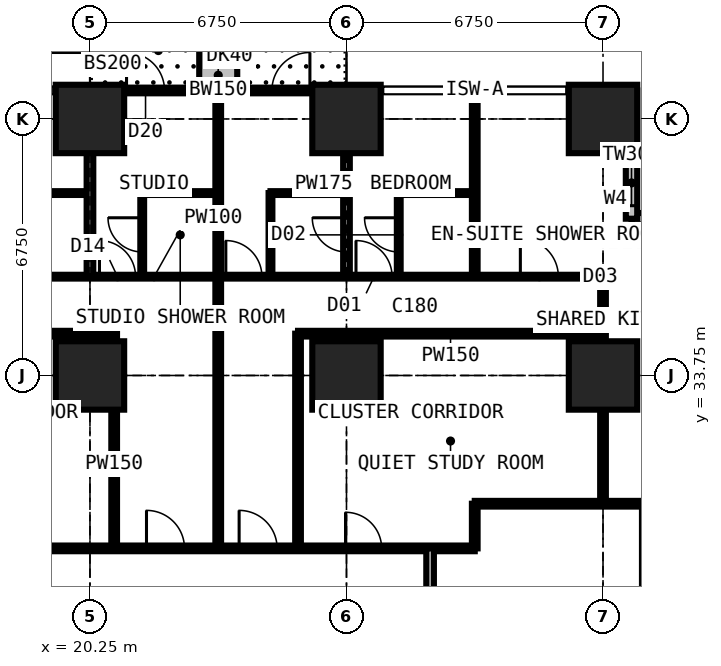
"""IFC4 building model, lengths in metres.
Left out: names, types, materials, properties, quantities, classifications, styles, units other than length and angle.
Written with IfcOpenShell. Run it as: python <this file> out.ifc"""

import sys

from ifc_helpers import new_model, si_unit, direction, frame, frame_2d, origin, origin_2d, place, context, subcontext, project, spatial, rectangle, extrude, element, fill, save


model = new_model("IFC4")
c1 = context("Model", 3, precision=1e-05, world=origin(), true_north=direction((0.0, 1.0)))
c2 = subcontext(c1, "Body", "Model", "MODEL_VIEW")
j1 = project(units=[si_unit("LENGTHUNIT", "METRE"), si_unit("PLANEANGLEUNIT", "RADIAN")], contexts=[c1])
p1 = place(None, origin())
s1 = spatial("IfcSite", under=j1, at=p1, CompositionType="ELEMENT")
p2 = place(p1, origin())
s2 = spatial("IfcBuilding", under=s1, at=p2, CompositionType="ELEMENT")
p3 = place(p2, frame((0.0, 0.0, 50.4)))
s3 = spatial("IfcBuildingStorey", under=s2, at=p3, CompositionType="ELEMENT", Elevation=50.4)
for number, where, z_axis, x_axis in (
    (1, (20.25, 33.75, 0.0), (0.0, 0.0, 1.0), (1.0, 0.0, 0.0)),
    (2, (20.25, 40.5, 0.0), (0.0, 0.0, 1.0), (1.0, 0.0, 0.0)),
    (3, (27.0, 33.75, 0.0), (0.0, 0.0, 1.0), (1.0, 0.0, 0.0)),
    (4, (27.0, 40.5, 0.0), (0.0, 0.0, 1.0), (1.0, 0.0, 0.0)),
    (5, (33.75, 33.75, 0.0), (0.0, 0.0, 1.0), (1.0, 0.0, 0.0)),
    (6, (33.75, 40.5, 0.0), (0.0, 0.0, 1.0), (1.0, 0.0, 0.0)),
):
    element("IfcColumn", number, at=place(p3, frame(where, z_axis=z_axis, x_axis=x_axis)), inside=s3, PredefinedType="COLUMN", context=c2, shape_type="SweptSolid", body=[
        extrude(rectangle(XDim=1.8, YDim=1.8, at=origin_2d()), origin(), (0.0, 0.0, 1.0), 3.6),
    ])
p4 = place(p3, frame((37.875, 37.875, 0.0), z_axis=(0.0, 0.0, 1.0), x_axis=(-1.0, 0.0, 0.0)))
e7 = element("IfcWall", 7, at=p4, inside=s3, PredefinedType="SOLIDWALL", context=c2, shape_type="SweptSolid", body=[
    extrude(rectangle(XDim=3.375, YDim=0.3, at=frame_2d((1.688, 0.0))), origin(), (0.0, 0.0, 1.0), 3.375),
])
p5 = place(p4, frame((0.788, 0.0, 0.6)))
e8 = element("IfcOpeningElement", 8, at=p5, cuts=e7, PredefinedType="OPENING", context=c2, shape_type="SweptSolid", body=[
    extrude(rectangle(XDim=1.8, YDim=2.1, at=frame_2d((0.9, 1.05))), frame((0.0, 0.16, 0.0), z_axis=(0.0, -1.0, 0.0), x_axis=(1.0, 0.0, 0.0)), (0.0, 0.0, 1.0), 0.32),
])
p6 = place(p3, frame((34.5, 37.875, 0.0), z_axis=(0.0, 0.0, 1.0), x_axis=(0.0, 1.0, 0.0)))
e9 = element("IfcWall", 9, at=p6, inside=s3, PredefinedType="SOLIDWALL", context=c2, shape_type="SweptSolid", body=[
    extrude(rectangle(XDim=3.375, YDim=0.3, at=frame_2d((1.688, 0.0))), origin(), (0.0, 0.0, 1.0), 3.375),
])
p7 = place(p6, frame((0.343, 0.0, 0.9)))
e10 = element("IfcOpeningElement", 10, at=p7, cuts=e9, PredefinedType="OPENING", context=c2, shape_type="SweptSolid", body=[
    extrude(rectangle(XDim=1.2, YDim=1.8, at=frame_2d((0.6, 0.9))), frame((0.0, 0.16, 0.0), z_axis=(0.0, -1.0, 0.0), x_axis=(1.0, 0.0, 0.0)), (0.0, 0.0, 1.0), 0.32),
])
p8 = place(p3, frame((20.25, 41.25, 0.0), z_axis=(0.0, 0.0, 1.0), x_axis=(1.0, 0.0, 0.0)))
e11 = element("IfcWall", 11, at=p8, inside=s3, PredefinedType="SOLIDWALL", context=c2, shape_type="SweptSolid", body=[
    extrude(rectangle(XDim=6.75, YDim=0.15, at=frame_2d((3.375, 0.0))), origin(), (0.0, 0.0, 1.0), 3.375),
])
p9 = place(p8, frame((0.962, 0.0, 0.0)))
e12 = element("IfcOpeningElement", 12, at=p9, cuts=e11, PredefinedType="OPENING", context=c2, shape_type="SweptSolid", body=[
    extrude(rectangle(XDim=1.0, YDim=2.2, at=frame_2d((0.5, 1.1))), frame((0.0, 0.085, 0.0), z_axis=(0.0, -1.0, 0.0), x_axis=(1.0, 0.0, 0.0)), (0.0, 0.0, 1.0), 0.17),
])
p10 = place(p8, frame((2.025, 0.0, 0.9)))
e13 = element("IfcOpeningElement", 13, at=p10, cuts=e11, PredefinedType="OPENING", context=c2, shape_type="SweptSolid", body=[
    extrude(rectangle(XDim=1.2, YDim=1.8, at=frame_2d((0.6, 0.9))), frame((0.0, 0.085, 0.0), z_axis=(0.0, -1.0, 0.0), x_axis=(1.0, 0.0, 0.0)), (0.0, 0.0, 1.0), 0.17),
])
p11 = place(p8, frame((4.788, 0.0, 0.0)))
e14 = element("IfcOpeningElement", 14, at=p11, cuts=e11, PredefinedType="OPENING", context=c2, shape_type="SweptSolid", body=[
    extrude(rectangle(XDim=1.0, YDim=2.2, at=frame_2d((0.5, 1.1))), frame((0.0, 0.085, 0.0), z_axis=(0.0, -1.0, 0.0), x_axis=(1.0, 0.0, 0.0)), (0.0, 0.0, 1.0), 0.17),
])
p12 = place(p8, frame((3.525, 0.0, 0.9)))
e15 = element("IfcOpeningElement", 15, at=p12, cuts=e11, PredefinedType="OPENING", context=c2, shape_type="SweptSolid", body=[
    extrude(rectangle(XDim=1.2, YDim=1.8, at=frame_2d((0.6, 0.9))), frame((0.0, 0.085, 0.0), z_axis=(0.0, -1.0, 0.0), x_axis=(1.0, 0.0, 0.0)), (0.0, 0.0, 1.0), 0.17),
])
p13 = place(p3, frame((23.625, 41.35, 0.0), z_axis=(0.0, 0.0, 1.0), x_axis=(0.0, 1.0, 0.0)))
e16 = element("IfcWall", 16, at=p13, inside=s3, PredefinedType="USERDEFINED", context=c2, shape_type="SweptSolid", body=[
    extrude(rectangle(XDim=2.2, YDim=1.0, at=frame_2d((1.1, 0.0))), origin(), (0.0, 0.0, 1.0), 0.9),
])
p14 = place(p3, frame((10.125, 34.85, 0.0), z_axis=(0.0, 0.0, 1.0), x_axis=(1.0, 0.0, 0.0)))
e17 = element("IfcWall", 17, at=p14, inside=s3, PredefinedType="PARTITIONING", context=c2, shape_type="SweptSolid", body=[
    extrude(rectangle(XDim=10.762, YDim=0.15, at=frame_2d((5.381, 0.0))), origin(), (0.0, 0.0, 1.0), 3.375),
])
p15 = place(p14, frame((4.9, 0.0, 0.0)))
e18 = element("IfcOpeningElement", 18, at=p15, cuts=e17, PredefinedType="OPENING", context=c2, shape_type="SweptSolid", body=[
    extrude(rectangle(XDim=0.95, YDim=2.2, at=frame_2d((0.475, 1.1))), frame((0.0, 0.085, 0.0), z_axis=(0.0, -1.0, 0.0), x_axis=(1.0, 0.0, 0.0)), (0.0, 0.0, 1.0), 0.17),
])
p16 = place(p3, frame((10.125, 36.35, 0.0), z_axis=(0.0, 0.0, 1.0), x_axis=(1.0, 0.0, 0.0)))
e19 = element("IfcWall", 19, at=p16, inside=s3, PredefinedType="PARTITIONING", context=c2, shape_type="SweptSolid", body=[
    extrude(rectangle(XDim=23.625, YDim=0.1, at=frame_2d((11.812, 0.0))), origin(), (0.0, 0.0, 1.0), 3.375),
])
p17 = place(p16, frame((21.45, 0.0, 0.0)))
e20 = element("IfcOpeningElement", 20, at=p17, cuts=e19, PredefinedType="OPENING", context=c2, shape_type="SweptSolid", body=[
    extrude(rectangle(XDim=1.0, YDim=2.2, at=frame_2d((0.5, 1.1))), frame((0.0, 0.06, 0.0), z_axis=(0.0, -1.0, 0.0), x_axis=(1.0, 0.0, 0.0)), (0.0, 0.0, 1.0), 0.12),
])
p18 = place(p16, frame((17.125, 0.0, 0.0)))
e21 = element("IfcOpeningElement", 21, at=p18, cuts=e19, PredefinedType="OPENING", context=c2, shape_type="SweptSolid", body=[
    extrude(rectangle(XDim=0.95, YDim=2.2, at=frame_2d((0.475, 1.1))), frame((0.0, 0.06, 0.0), z_axis=(0.0, -1.0, 0.0), x_axis=(1.0, 0.0, 0.0)), (0.0, 0.0, 1.0), 0.12),
])
p19 = place(p16, frame((13.7, 0.0, 0.0)))
e22 = element("IfcOpeningElement", 22, at=p19, cuts=e19, PredefinedType="OPENING", context=c2, shape_type="SweptSolid", body=[
    extrude(rectangle(XDim=0.95, YDim=2.2, at=frame_2d((0.475, 1.1))), frame((0.0, 0.06, 0.0), z_axis=(0.0, -1.0, 0.0), x_axis=(1.0, 0.0, 0.0)), (0.0, 0.0, 1.0), 0.12),
])
p20 = place(p16, frame((0.2, 0.0, 0.0)))
e23 = element("IfcOpeningElement", 23, at=p20, cuts=e19, PredefinedType="OPENING", context=c2, shape_type="SweptSolid", body=[
    extrude(rectangle(XDim=0.95, YDim=2.2, at=frame_2d((0.475, 1.1))), frame((0.0, 0.06, 0.0), z_axis=(0.0, -1.0, 0.0), x_axis=(1.0, 0.0, 0.0)), (0.0, 0.0, 1.0), 0.12),
])
p21 = place(p16, frame((3.625, 0.0, 0.0)))
e24 = element("IfcOpeningElement", 24, at=p21, cuts=e19, PredefinedType="OPENING", context=c2, shape_type="SweptSolid", body=[
    extrude(rectangle(XDim=0.95, YDim=2.2, at=frame_2d((0.475, 1.1))), frame((0.0, 0.06, 0.0), z_axis=(0.0, -1.0, 0.0), x_axis=(1.0, 0.0, 0.0)), (0.0, 0.0, 1.0), 0.12),
])
p22 = place(p16, frame((7.0, 0.0, 0.0)))
e25 = element("IfcOpeningElement", 25, at=p22, cuts=e19, PredefinedType="OPENING", context=c2, shape_type="SweptSolid", body=[
    extrude(rectangle(XDim=0.95, YDim=2.2, at=frame_2d((0.475, 1.1))), frame((0.0, 0.06, 0.0), z_axis=(0.0, -1.0, 0.0), x_axis=(1.0, 0.0, 0.0)), (0.0, 0.0, 1.0), 0.12),
])
p23 = place(p16, frame((10.375, 0.0, 0.0)))
e26 = element("IfcOpeningElement", 26, at=p23, cuts=e19, PredefinedType="OPENING", context=c2, shape_type="SweptSolid", body=[
    extrude(rectangle(XDim=0.95, YDim=2.2, at=frame_2d((0.475, 1.1))), frame((0.0, 0.06, 0.0), z_axis=(0.0, -1.0, 0.0), x_axis=(1.0, 0.0, 0.0)), (0.0, 0.0, 1.0), 0.12),
])
p24 = place(p3, frame((11.3, 29.2, 0.0), z_axis=(0.0, 0.0, 1.0), x_axis=(1.0, 0.0, 0.0)))
e27 = element("IfcWall", 27, at=p24, inside=s3, PredefinedType="PARTITIONING", context=c2, shape_type="SweptSolid", body=[
    extrude(rectangle(XDim=19.075, YDim=0.15, at=frame_2d((9.538, 0.0))), origin(), (0.0, 0.0, 1.0), 3.375),
])
p25 = place(p24, frame((12.875, 0.0, 0.0)))
e28 = element("IfcOpeningElement", 28, at=p25, cuts=e27, PredefinedType="OPENING", context=c2, shape_type="SweptSolid", body=[
    extrude(rectangle(XDim=1.0, YDim=2.2, at=frame_2d((0.5, 1.1))), frame((0.0, 0.085, 0.0), z_axis=(0.0, -1.0, 0.0), x_axis=(1.0, 0.0, 0.0)), (0.0, 0.0, 1.0), 0.17),
])
p26 = place(p24, frame((10.438, 0.0, 0.0)))
e29 = element("IfcOpeningElement", 29, at=p26, cuts=e27, PredefinedType="OPENING", context=c2, shape_type="SweptSolid", body=[
    extrude(rectangle(XDim=1.0, YDim=2.2, at=frame_2d((0.5, 1.1))), frame((0.0, 0.085, 0.0), z_axis=(0.0, -1.0, 0.0), x_axis=(1.0, 0.0, 0.0)), (0.0, 0.0, 1.0), 0.17),
])
p27 = place(p24, frame((15.675, 0.0, 0.0)))
e30 = element("IfcOpeningElement", 30, at=p27, cuts=e27, PredefinedType="OPENING", context=c2, shape_type="SweptSolid", body=[
    extrude(rectangle(XDim=0.95, YDim=2.2, at=frame_2d((0.475, 1.1))), frame((0.0, 0.085, 0.0), z_axis=(0.0, -1.0, 0.0), x_axis=(1.0, 0.0, 0.0)), (0.0, 0.0, 1.0), 0.17),
])
p28 = place(p3, frame((18.25, 38.55, 0.0), z_axis=(0.0, 0.0, 1.0), x_axis=(1.0, 0.0, 0.0)))
e31 = element("IfcWall", 31, at=p28, inside=s3, PredefinedType="PARTITIONING", context=c2, shape_type="SweptSolid", body=[
    extrude(rectangle(XDim=2.0, YDim=0.1, at=frame_2d((1.0, 0.0))), origin(), (0.0, 0.0, 1.0), 3.375),
])
p29 = place(p3, frame((20.25, 36.35, 0.0), z_axis=(0.0, 0.0, 1.0), x_axis=(0.0, 1.0, 0.0)))
e32 = element("IfcWall", 32, at=p29, inside=s3, PredefinedType="PARTITIONING", context=c2, shape_type="SweptSolid", body=[
    extrude(rectangle(XDim=4.884, YDim=0.175, at=frame_2d((2.442, 0.0))), origin(), (0.0, 0.0, 1.0), 2.61),
])
p30 = place(p3, frame((20.887, 29.2, 0.0), z_axis=(0.0, 0.0, 1.0), x_axis=(0.0, 1.0, 0.0)))
e33 = element("IfcWall", 33, at=p30, inside=s3, PredefinedType="PARTITIONING", context=c2, shape_type="SweptSolid", body=[
    extrude(rectangle(XDim=5.65, YDim=0.15, at=frame_2d((2.825, 0.0))), origin(), (0.0, 0.0, 1.0), 3.375),
])
p31 = place(p3, frame((21.625, 36.35, 0.0), z_axis=(0.0, 0.0, 1.0), x_axis=(0.0, 1.0, 0.0)))
e34 = element("IfcWall", 34, at=p31, inside=s3, PredefinedType="PARTITIONING", context=c2, shape_type="SweptSolid", body=[
    extrude(rectangle(XDim=2.2, YDim=0.1, at=frame_2d((1.1, 0.0))), origin(), (0.0, 0.0, 1.0), 3.375),
])
p32 = place(p31, frame((0.65, 0.0, 0.0)))
e35 = element("IfcOpeningElement", 35, at=p32, cuts=e34, PredefinedType="OPENING", context=c2, shape_type="SweptSolid", body=[
    extrude(rectangle(XDim=0.9, YDim=2.2, at=frame_2d((0.45, 1.1))), frame((0.0, 0.06, 0.0), z_axis=(0.0, -1.0, 0.0), x_axis=(1.0, 0.0, 0.0)), (0.0, 0.0, 1.0), 0.12),
])
p33 = place(p3, frame((21.625, 38.55, 0.0), z_axis=(0.0, 0.0, 1.0), x_axis=(1.0, 0.0, 0.0)))
e36 = element("IfcWall", 36, at=p33, inside=s3, PredefinedType="PARTITIONING", context=c2, shape_type="SweptSolid", body=[
    extrude(rectangle(XDim=2.0, YDim=0.1, at=frame_2d((1.0, 0.0))), origin(), (0.0, 0.0, 1.0), 3.375),
])
p34 = place(p3, frame((23.625, 29.2, 0.0), z_axis=(0.0, 0.0, 1.0), x_axis=(0.0, 1.0, 0.0)))
e37 = element("IfcWall", 37, at=p34, inside=s3, PredefinedType="PARTITIONING", context=c2, shape_type="SweptSolid", body=[
    extrude(rectangle(XDim=12.034, YDim=0.15, at=frame_2d((6.017, 0.0))), origin(), (0.0, 0.0, 1.0), 3.375),
])
p35 = place(p3, frame((25.0, 36.35, 0.0), z_axis=(0.0, 0.0, 1.0), x_axis=(0.0, 1.0, 0.0)))
e38 = element("IfcWall", 38, at=p35, inside=s3, PredefinedType="PARTITIONING", context=c2, shape_type="SweptSolid", body=[
    extrude(rectangle(XDim=2.2, YDim=0.1, at=frame_2d((1.1, 0.0))), origin(), (0.0, 0.0, 1.0), 3.375),
])
p36 = place(p3, frame((25.0, 38.55, 0.0), z_axis=(0.0, 0.0, 1.0), x_axis=(1.0, 0.0, 0.0)))
e39 = element("IfcWall", 39, at=p36, inside=s3, PredefinedType="PARTITIONING", context=c2, shape_type="SweptSolid", body=[
    extrude(rectangle(XDim=2.0, YDim=0.1, at=frame_2d((1.0, 0.0))), origin(), (0.0, 0.0, 1.0), 3.375),
])
p37 = place(p3, frame((25.725, 29.2, 0.0), z_axis=(0.0, 0.0, 1.0), x_axis=(0.0, 1.0, 0.0)))
e40 = element("IfcWall", 40, at=p37, inside=s3, PredefinedType="PARTITIONING", context=c2, shape_type="SweptSolid", body=[
    extrude(rectangle(XDim=5.65, YDim=0.15, at=frame_2d((2.825, 0.0))), origin(), (0.0, 0.0, 1.0), 3.375),
])
p38 = place(p3, frame((25.725, 34.85, 0.0), z_axis=(0.0, 0.0, 1.0), x_axis=(1.0, 0.0, 0.0)))
e41 = element("IfcWall", 41, at=p38, inside=s3, PredefinedType="PARTITIONING", context=c2, shape_type="SweptSolid", body=[
    extrude(rectangle(XDim=8.025, YDim=0.15, at=frame_2d((4.012, 0.0))), origin(), (0.0, 0.0, 1.0), 3.375),
])
p39 = place(p3, frame((27.0, 36.35, 0.0), z_axis=(0.0, 0.0, 1.0), x_axis=(0.0, 1.0, 0.0)))
e42 = element("IfcWall", 42, at=p39, inside=s3, PredefinedType="PARTITIONING", context=c2, shape_type="SweptSolid", body=[
    extrude(rectangle(XDim=4.884, YDim=0.175, at=frame_2d((2.442, 0.0))), origin(), (0.0, 0.0, 1.0), 2.877),
])
p40 = place(p39, frame((0.65, 0.0, 0.0)))
e43 = element("IfcOpeningElement", 43, at=p40, cuts=e42, PredefinedType="OPENING", context=c2, shape_type="SweptSolid", body=[
    extrude(rectangle(XDim=0.9, YDim=2.2, at=frame_2d((0.45, 1.1))), frame((0.0, 0.097, 0.0), z_axis=(0.0, -1.0, 0.0), x_axis=(1.0, 0.0, 0.0)), (0.0, 0.0, 1.0), 0.195),
])
p41 = place(p3, frame((28.375, 36.35, 0.0), z_axis=(0.0, 0.0, 1.0), x_axis=(0.0, 1.0, 0.0)))
e44 = element("IfcWall", 44, at=p41, inside=s3, PredefinedType="PARTITIONING", context=c2, shape_type="SweptSolid", body=[
    extrude(rectangle(XDim=2.2, YDim=0.1, at=frame_2d((1.1, 0.0))), origin(), (0.0, 0.0, 1.0), 3.375),
])
p42 = place(p41, frame((0.65, 0.0, 0.0)))
e45 = element("IfcOpeningElement", 45, at=p42, cuts=e44, PredefinedType="OPENING", context=c2, shape_type="SweptSolid", body=[
    extrude(rectangle(XDim=0.9, YDim=2.2, at=frame_2d((0.45, 1.1))), frame((0.0, 0.06, 0.0), z_axis=(0.0, -1.0, 0.0), x_axis=(1.0, 0.0, 0.0)), (0.0, 0.0, 1.0), 0.12),
])
p43 = place(p3, frame((28.375, 38.55, 0.0), z_axis=(0.0, 0.0, 1.0), x_axis=(1.0, 0.0, 0.0)))
e46 = element("IfcWall", 46, at=p43, inside=s3, PredefinedType="PARTITIONING", context=c2, shape_type="SweptSolid", body=[
    extrude(rectangle(XDim=2.0, YDim=0.1, at=frame_2d((1.0, 0.0))), origin(), (0.0, 0.0, 1.0), 3.375),
])
p44 = place(p3, frame((29.2, 11.3, 0.0), z_axis=(0.0, 0.0, 1.0), x_axis=(0.0, 1.0, 0.0)))
e47 = element("IfcWall", 47, at=p44, inside=s3, PredefinedType="PARTITIONING", context=c2, shape_type="SweptSolid", body=[
    extrude(rectangle(XDim=17.9, YDim=0.2, at=frame_2d((8.95, 0.0))), origin(), (0.0, 0.0, 1.0), 3.375),
])
p45 = place(p44, frame((8.35, 0.0, 0.0)))
e48 = element("IfcOpeningElement", 48, at=p45, cuts=e47, PredefinedType="OPENING", context=c2, shape_type="SweptSolid", body=[
    extrude(rectangle(XDim=1.2, YDim=2.2, at=frame_2d((0.6, 1.1))), frame((0.0, 0.11, 0.0), z_axis=(0.0, -1.0, 0.0), x_axis=(1.0, 0.0, 0.0)), (0.0, 0.0, 1.0), 0.22),
])
p46 = place(p3, frame((30.375, 29.2, 0.0), z_axis=(0.0, 0.0, 1.0), x_axis=(0.0, 1.0, 0.0)))
e49 = element("IfcWall", 49, at=p46, inside=s3, PredefinedType="PARTITIONING", context=c2, shape_type="SweptSolid", body=[
    extrude(rectangle(XDim=1.175, YDim=0.15, at=frame_2d((0.587, 0.0))), origin(), (0.0, 0.0, 1.0), 3.375),
])
p47 = place(p3, frame((30.375, 30.375, 0.0), z_axis=(0.0, 0.0, 1.0), x_axis=(1.0, 0.0, 0.0)))
e50 = element("IfcWall", 50, at=p47, inside=s3, PredefinedType="PARTITIONING", context=c2, shape_type="SweptSolid", body=[
    extrude(rectangle(XDim=10.859, YDim=0.15, at=frame_2d((5.429, 0.0))), origin(), (0.0, 0.0, 1.0), 3.375),
])
p48 = place(p3, frame((30.375, 36.35, 0.0), z_axis=(0.0, 0.0, 1.0), x_axis=(0.0, 1.0, 0.0)))
e51 = element("IfcWall", 51, at=p48, inside=s3, PredefinedType="PARTITIONING", context=c2, shape_type="SweptSolid", body=[
    extrude(rectangle(XDim=4.884, YDim=0.15, at=frame_2d((2.442, 0.0))), origin(), (0.0, 0.0, 1.0), 3.375),
])
p49 = place(p3, frame((33.75, 30.375, 0.0), z_axis=(0.0, 0.0, 1.0), x_axis=(0.0, 1.0, 0.0)))
e52 = element("IfcWall", 52, at=p49, inside=s3, PredefinedType="PARTITIONING", context=c2, shape_type="SweptSolid", body=[
    extrude(rectangle(XDim=5.975, YDim=0.15, at=frame_2d((2.988, 0.0))), origin(), (0.0, 0.0, 1.0), 2.877),
])
p50 = place(p7, origin())
e53 = element("IfcWindow", 53, at=p50, inside=s3, PartitioningType="SINGLE_PANEL", PredefinedType="WINDOW", context=c2, shape_type="SweptSolid", body=[
    extrude(rectangle(XDim=1.2, YDim=1.8, at=frame_2d((0.6, 0.9))), frame((0.0, 0.03, 0.0), z_axis=(0.0, -1.0, 0.0), x_axis=(1.0, 0.0, 0.0)), (0.0, 0.0, 1.0), 0.06),
])
fill(e10, e53)
p51 = place(p9, origin())
e54 = element("IfcDoor", 54, at=p51, inside=s3, OperationType="SINGLE_SWING_LEFT", PredefinedType="DOOR", context=c2, shape_type="SweptSolid", body=[
    extrude(rectangle(XDim=1.0, YDim=2.2, at=frame_2d((0.5, 1.1))), frame((0.0, 0.025, 0.0), z_axis=(0.0, -1.0, 0.0), x_axis=(1.0, 0.0, 0.0)), (0.0, 0.0, 1.0), 0.05),
])
fill(e12, e54)
p52 = place(p10, origin())
e55 = element("IfcWindow", 55, at=p52, inside=s3, PartitioningType="SINGLE_PANEL", PredefinedType="WINDOW", context=c2, shape_type="SweptSolid", body=[
    extrude(rectangle(XDim=1.2, YDim=1.8, at=frame_2d((0.6, 0.9))), frame((0.0, 0.03, 0.0), z_axis=(0.0, -1.0, 0.0), x_axis=(1.0, 0.0, 0.0)), (0.0, 0.0, 1.0), 0.06),
])
fill(e13, e55)
p53 = place(p11, origin())
e56 = element("IfcDoor", 56, at=p53, inside=s3, OperationType="SINGLE_SWING_RIGHT", PredefinedType="DOOR", context=c2, shape_type="SweptSolid", body=[
    extrude(rectangle(XDim=1.0, YDim=2.2, at=frame_2d((0.5, 1.1))), frame((0.0, 0.025, 0.0), z_axis=(0.0, -1.0, 0.0), x_axis=(1.0, 0.0, 0.0)), (0.0, 0.0, 1.0), 0.05),
])
fill(e14, e56)
p54 = place(p12, origin())
e57 = element("IfcWindow", 57, at=p54, inside=s3, PartitioningType="SINGLE_PANEL", PredefinedType="WINDOW", context=c2, shape_type="SweptSolid", body=[
    extrude(rectangle(XDim=1.2, YDim=1.8, at=frame_2d((0.6, 0.9))), frame((0.0, 0.03, 0.0), z_axis=(0.0, -1.0, 0.0), x_axis=(1.0, 0.0, 0.0)), (0.0, 0.0, 1.0), 0.06),
])
fill(e15, e57)
p55 = place(p17, origin())
e58 = element("IfcDoor", 58, at=p55, inside=s3, OperationType="SINGLE_SWING_LEFT", PredefinedType="DOOR", context=c2, shape_type="SweptSolid", body=[
    extrude(rectangle(XDim=1.0, YDim=2.2, at=frame_2d((0.5, 1.1))), frame((0.0, 0.025, 0.0), z_axis=(0.0, -1.0, 0.0), x_axis=(1.0, 0.0, 0.0)), (0.0, 0.0, 1.0), 0.05),
])
fill(e20, e58)
p56 = place(p18, origin())
e59 = element("IfcDoor", 59, at=p56, inside=s3, OperationType="SINGLE_SWING_LEFT", PredefinedType="DOOR", context=c2, shape_type="SweptSolid", body=[
    extrude(rectangle(XDim=0.95, YDim=2.2, at=frame_2d((0.475, 1.1))), frame((0.0, 0.025, 0.0), z_axis=(0.0, -1.0, 0.0), x_axis=(1.0, 0.0, 0.0)), (0.0, 0.0, 1.0), 0.05),
])
fill(e21, e59)
p57 = place(p42, origin())
e60 = element("IfcDoor", 60, at=p57, inside=s3, OperationType="SINGLE_SWING_RIGHT", PredefinedType="DOOR", context=c2, shape_type="SweptSolid", body=[
    extrude(rectangle(XDim=0.9, YDim=2.2, at=frame_2d((0.45, 1.1))), frame((0.0, 0.025, 0.0), z_axis=(0.0, -1.0, 0.0), x_axis=(1.0, 0.0, 0.0)), (0.0, 0.0, 1.0), 0.05),
])
fill(e45, e60)
p58 = place(p19, origin())
e61 = element("IfcDoor", 61, at=p58, inside=s3, OperationType="SINGLE_SWING_LEFT", PredefinedType="DOOR", context=c2, shape_type="SweptSolid", body=[
    extrude(rectangle(XDim=0.95, YDim=2.2, at=frame_2d((0.475, 1.1))), frame((0.0, 0.025, 0.0), z_axis=(0.0, -1.0, 0.0), x_axis=(1.0, 0.0, 0.0)), (0.0, 0.0, 1.0), 0.05),
])
fill(e22, e61)
p59 = place(p40, origin())
e62 = element("IfcDoor", 62, at=p59, inside=s3, OperationType="SINGLE_SWING_RIGHT", PredefinedType="DOOR", context=c2, shape_type="SweptSolid", body=[
    extrude(rectangle(XDim=0.9, YDim=2.2, at=frame_2d((0.45, 1.1))), frame((0.0, 0.025, 0.0), z_axis=(0.0, -1.0, 0.0), x_axis=(1.0, 0.0, 0.0)), (0.0, 0.0, 1.0), 0.05),
])
fill(e43, e62)
p60 = place(p25, origin())
e63 = element("IfcDoor", 63, at=p60, inside=s3, OperationType="SINGLE_SWING_LEFT", PredefinedType="DOOR", context=c2, shape_type="SweptSolid", body=[
    extrude(rectangle(XDim=1.0, YDim=2.2, at=frame_2d((0.5, 1.1))), frame((0.0, 0.025, 0.0), z_axis=(0.0, -1.0, 0.0), x_axis=(1.0, 0.0, 0.0)), (0.0, 0.0, 1.0), 0.05),
])
fill(e28, e63)
p61 = place(p23, origin())
e64 = element("IfcDoor", 64, at=p61, inside=s3, OperationType="SINGLE_SWING_LEFT", PredefinedType="DOOR", context=c2, shape_type="SweptSolid", body=[
    extrude(rectangle(XDim=0.95, YDim=2.2, at=frame_2d((0.475, 1.1))), frame((0.0, 0.025, 0.0), z_axis=(0.0, -1.0, 0.0), x_axis=(1.0, 0.0, 0.0)), (0.0, 0.0, 1.0), 0.05),
])
fill(e26, e64)
p62 = place(p32, origin())
e65 = element("IfcDoor", 65, at=p62, inside=s3, OperationType="SINGLE_SWING_RIGHT", PredefinedType="DOOR", context=c2, shape_type="SweptSolid", body=[
    extrude(rectangle(XDim=0.9, YDim=2.2, at=frame_2d((0.45, 1.1))), frame((0.0, 0.025, 0.0), z_axis=(0.0, -1.0, 0.0), x_axis=(1.0, 0.0, 0.0)), (0.0, 0.0, 1.0), 0.05),
])
fill(e35, e65)
p63 = place(p26, origin())
e66 = element("IfcDoor", 66, at=p63, inside=s3, OperationType="SINGLE_SWING_LEFT", PredefinedType="DOOR", context=c2, shape_type="SweptSolid", body=[
    extrude(rectangle(XDim=1.0, YDim=2.2, at=frame_2d((0.5, 1.1))), frame((0.0, 0.025, 0.0), z_axis=(0.0, -1.0, 0.0), x_axis=(1.0, 0.0, 0.0)), (0.0, 0.0, 1.0), 0.05),
])
fill(e29, e66)
p64 = place(p27, origin())
e67 = element("IfcDoor", 67, at=p64, inside=s3, OperationType="SINGLE_SWING_LEFT", PredefinedType="DOOR", context=c2, shape_type="SweptSolid", body=[
    extrude(rectangle(XDim=0.95, YDim=2.2, at=frame_2d((0.475, 1.1))), frame((0.0, 0.025, 0.0), z_axis=(0.0, -1.0, 0.0), x_axis=(1.0, 0.0, 0.0)), (0.0, 0.0, 1.0), 0.05),
])
fill(e30, e67)
save(model, sys.argv[1])
